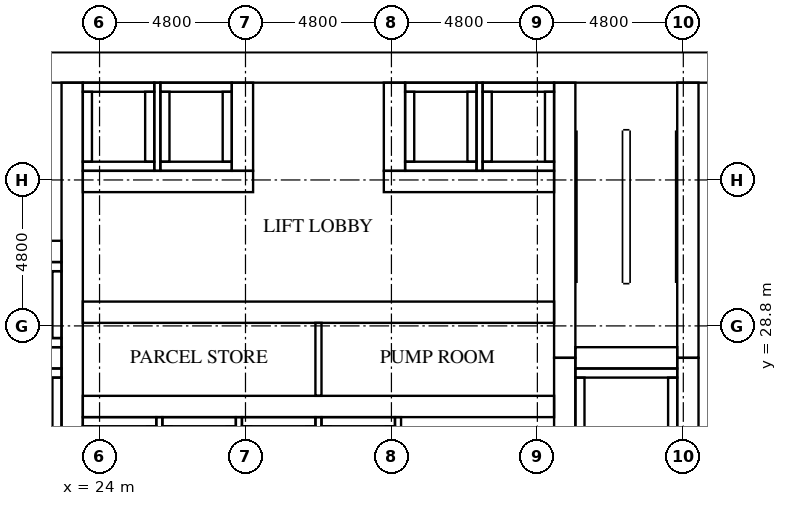
"""IFC4 building model, lengths in metres.
Left out: names, types, materials, properties, quantities, classifications, styles, units other than length and angle.
Written with IfcOpenShell. Run it as: python <this file> out.ifc"""

import sys

from ifc_helpers import new_model, si_unit, direction, frame, frame_2d, origin, place, context, subcontext, project, spatial, rectangle, extrude, element, fill, save


model = new_model("IFC4")
c1 = context("Model", 3, precision=1e-05, world=origin(), true_north=direction((0.0, 1.0)))
c2 = subcontext(c1, "Body", "Model", "MODEL_VIEW")
j1 = project(units=[si_unit("LENGTHUNIT", "METRE"), si_unit("PLANEANGLEUNIT", "RADIAN")], contexts=[c1])
p1 = place(None, origin())
s1 = spatial("IfcSite", under=j1, at=p1, CompositionType="ELEMENT")
p2 = place(p1, origin())
s2 = spatial("IfcBuilding", under=s1, at=p2, CompositionType="ELEMENT")
p3 = place(p2, origin())
s3 = spatial("IfcBuildingStorey", under=s2, at=p3, CompositionType="ELEMENT", Elevation=0.0)
p4 = place(p3, frame((15.0, 37.3, 0.0), z_axis=(0.0, 0.0, 1.0), x_axis=(1.0, 0.0, 0.0)))
e1 = element("IfcWall", 1, at=p4, inside=s3, PredefinedType="SHEAR", context=c2, shape_type="SweptSolid", body=[
    extrude(rectangle(XDim=32.4, YDim=1.0, at=frame_2d((16.2, 0.0))), origin(), (0.0, 0.0, 1.0), 5.7),
])
p5 = place(p4, frame((15.3, 0.0, 0.0)))
e2 = element("IfcOpeningElement", 2, at=p5, cuts=e1, PredefinedType="OPENING", context=c2, shape_type="SweptSolid", body=[
    extrude(rectangle(XDim=1.8, YDim=2.1, at=frame_2d((0.9, 1.05))), frame((0.0, 0.51, 0.0), z_axis=(0.0, -1.0, 0.0), x_axis=(1.0, 0.0, 0.0)), (0.0, 0.0, 1.0), 1.02),
])
p6 = place(p4, frame((1.766, 0.0, 0.0)))
e3 = element("IfcOpeningElement", 3, at=p6, cuts=e1, PredefinedType="OPENING", context=c2, shape_type="SweptSolid", body=[
    extrude(rectangle(XDim=1.0, YDim=2.1, at=frame_2d((0.5, 1.05))), frame((0.0, 0.51, 0.0), z_axis=(0.0, -1.0, 0.0), x_axis=(1.0, 0.0, 0.0)), (0.0, 0.0, 1.0), 1.02),
])
p7 = place(p4, frame((5.241, 0.0, 0.0)))
e4 = element("IfcOpeningElement", 4, at=p7, cuts=e1, PredefinedType="OPENING", context=c2, shape_type="SweptSolid", body=[
    extrude(rectangle(XDim=1.0, YDim=2.1, at=frame_2d((0.5, 1.05))), frame((0.0, 0.51, 0.0), z_axis=(0.0, -1.0, 0.0), x_axis=(1.0, 0.0, 0.0)), (0.0, 0.0, 1.0), 1.02),
])
p8 = place(p3, frame((23.1, 16.0, 0.0), z_axis=(0.0, 0.0, 1.0), x_axis=(0.0, 1.0, 0.0)))
e5 = element("IfcWall", 5, at=p8, inside=s3, PredefinedType="SHEAR", context=c2, shape_type="SweptSolid", body=[
    extrude(rectangle(XDim=20.8, YDim=0.7, at=frame_2d((10.4, 0.0))), origin(), (0.0, 0.0, 1.0), 5.7),
])
p9 = place(p3, frame((39.3, 24.25, 0.0), z_axis=(0.0, 0.0, 1.0), x_axis=(0.0, 1.0, 0.0)))
e6 = element("IfcWall", 6, at=p9, inside=s3, PredefinedType="SHEAR", context=c2, shape_type="SweptSolid", body=[
    extrude(rectangle(XDim=3.5, YDim=0.7, at=frame_2d((1.75, 0.0))), origin(), (0.0, 0.0, 1.0), 5.7),
])
p10 = place(p3, frame((39.3, 27.75, 0.0), z_axis=(0.0, 0.0, 1.0), x_axis=(0.0, 1.0, 0.0)))
e7 = element("IfcWall", 7, at=p10, inside=s3, PredefinedType="SHEAR", context=c2, shape_type="SweptSolid", body=[
    extrude(rectangle(XDim=9.05, YDim=0.7, at=frame_2d((4.525, 0.0))), origin(), (0.0, 0.0, 1.0), 5.7),
])
p11 = place(p3, frame((43.35, 24.25, 0.0), z_axis=(0.0, 0.0, 1.0), x_axis=(0.0, 1.0, 0.0)))
e8 = element("IfcWall", 8, at=p11, inside=s3, PredefinedType="SHEAR", context=c2, shape_type="SweptSolid", body=[
    extrude(rectangle(XDim=3.5, YDim=0.7, at=frame_2d((1.75, 0.0))), origin(), (0.0, 0.0, 1.0), 5.7),
])
p12 = place(p11, frame((1.2, 0.0, 0.0)))
e9 = element("IfcOpeningElement", 9, at=p12, cuts=e8, PredefinedType="OPENING", context=c2, shape_type="SweptSolid", body=[
    extrude(rectangle(XDim=1.1, YDim=2.1, at=frame_2d((0.55, 1.05))), frame((0.0, 0.36, 0.0), z_axis=(0.0, -1.0, 0.0), x_axis=(1.0, 0.0, 0.0)), (0.0, 0.0, 1.0), 0.72),
])
p13 = place(p3, frame((43.35, 27.75, 0.0), z_axis=(0.0, 0.0, 1.0), x_axis=(0.0, 1.0, 0.0)))
e10 = element("IfcWall", 10, at=p13, inside=s3, PredefinedType="SHEAR", context=c2, shape_type="SweptSolid", body=[
    extrude(rectangle(XDim=9.05, YDim=0.7, at=frame_2d((4.525, 0.0))), origin(), (0.0, 0.0, 1.0), 5.7),
])
p14 = place(p13, frame((7.65, 0.0, 0.0)))
e11 = element("IfcOpeningElement", 11, at=p14, cuts=e10, PredefinedType="OPENING", context=c2, shape_type="SweptSolid", body=[
    extrude(rectangle(XDim=1.2, YDim=2.1, at=frame_2d((0.6, 1.05))), frame((0.0, 0.36, 0.0), z_axis=(0.0, -1.0, 0.0), x_axis=(1.0, 0.0, 0.0)), (0.0, 0.0, 1.0), 0.72),
])
p15 = place(p3, frame((19.4, 27.75, 0.0), z_axis=(0.0, 0.0, 1.0), x_axis=(1.0, 0.0, 0.0)))
e12 = element("IfcWall", 12, at=p15, inside=s3, PredefinedType="SHEAR", context=c2, shape_type="SweptSolid", body=[
    extrude(rectangle(XDim=3.35, YDim=0.7, at=frame_2d((1.675, 0.0))), origin(), (0.0, 0.0, 1.0), 5.7),
])
p16 = place(p3, frame((16.0, 31.25, 0.0), z_axis=(0.0, 0.0, 1.0), x_axis=(1.0, 0.0, 0.0)))
e13 = element("IfcWall", 13, at=p16, inside=s3, PredefinedType="SHEAR", context=c2, shape_type="SweptSolid", body=[
    extrude(rectangle(XDim=6.75, YDim=0.7, at=frame_2d((3.375, 0.0))), origin(), (0.0, 0.0, 1.0), 5.7),
])
p17 = place(p3, frame((39.65, 27.75, 0.0), z_axis=(0.0, 0.0, 1.0), x_axis=(1.0, 0.0, 0.0)))
e14 = element("IfcWall", 14, at=p17, inside=s3, PredefinedType="SHEAR", context=c2, shape_type="SweptSolid", body=[
    extrude(rectangle(XDim=3.35, YDim=0.7, at=frame_2d((1.675, 0.0))), origin(), (0.0, 0.0, 1.0), 5.7),
])
p18 = place(p3, frame((23.45, 26.15, 0.0), z_axis=(0.0, 0.0, 1.0), x_axis=(1.0, 0.0, 0.0)))
e15 = element("IfcWall", 15, at=p18, inside=s3, PredefinedType="SHEAR", context=c2, shape_type="SweptSolid", body=[
    extrude(rectangle(XDim=15.5, YDim=0.7, at=frame_2d((7.75, 0.0))), origin(), (0.0, 0.0, 1.0), 5.7),
])
p19 = place(p3, frame((23.45, 29.25, 0.0), z_axis=(0.0, 0.0, 1.0), x_axis=(1.0, 0.0, 0.0)))
e16 = element("IfcWall", 16, at=p19, inside=s3, PredefinedType="SHEAR", context=c2, shape_type="SweptSolid", body=[
    extrude(rectangle(XDim=15.5, YDim=0.7, at=frame_2d((7.75, 0.0))), origin(), (0.0, 0.0, 1.0), 5.7),
])
p20 = place(p19, frame((3.325, 0.0, 0.0)))
e17 = element("IfcOpeningElement", 17, at=p20, cuts=e16, PredefinedType="OPENING", context=c2, shape_type="SweptSolid", body=[
    extrude(rectangle(XDim=1.0, YDim=2.1, at=frame_2d((0.5, 1.05))), frame((0.0, 0.36, 0.0), z_axis=(0.0, -1.0, 0.0), x_axis=(1.0, 0.0, 0.0)), (0.0, 0.0, 1.0), 0.72),
])
p21 = place(p19, frame((11.175, 0.0, 0.0)))
e18 = element("IfcOpeningElement", 18, at=p21, cuts=e16, PredefinedType="OPENING", context=c2, shape_type="SweptSolid", body=[
    extrude(rectangle(XDim=1.0, YDim=2.1, at=frame_2d((0.5, 1.05))), frame((0.0, 0.36, 0.0), z_axis=(0.0, -1.0, 0.0), x_axis=(1.0, 0.0, 0.0)), (0.0, 0.0, 1.0), 0.72),
])
p22 = place(p3, frame((23.45, 33.55, 0.0), z_axis=(0.0, 0.0, 1.0), x_axis=(1.0, 0.0, 0.0)))
e19 = element("IfcWall", 19, at=p22, inside=s3, PredefinedType="SHEAR", context=c2, shape_type="SweptSolid", body=[
    extrude(rectangle(XDim=5.6, YDim=0.7, at=frame_2d((2.8, 0.0))), origin(), (0.0, 0.0, 1.0), 5.7),
])
p23 = place(p22, frame((0.625, 0.0, 0.0)))
e20 = element("IfcOpeningElement", 20, at=p23, cuts=e19, PredefinedType="OPENING", context=c2, shape_type="SweptSolid", body=[
    extrude(rectangle(XDim=1.1, YDim=2.1, at=frame_2d((0.55, 1.05))), frame((0.0, 0.36, 0.0), z_axis=(0.0, -1.0, 0.0), x_axis=(1.0, 0.0, 0.0)), (0.0, 0.0, 1.0), 0.72),
])
p24 = place(p22, frame((3.175, 0.0, 0.0)))
e21 = element("IfcOpeningElement", 21, at=p24, cuts=e19, PredefinedType="OPENING", context=c2, shape_type="SweptSolid", body=[
    extrude(rectangle(XDim=1.1, YDim=2.1, at=frame_2d((0.55, 1.05))), frame((0.0, 0.36, 0.0), z_axis=(0.0, -1.0, 0.0), x_axis=(1.0, 0.0, 0.0)), (0.0, 0.0, 1.0), 0.72),
])
p25 = place(p3, frame((33.35, 33.55, 0.0), z_axis=(0.0, 0.0, 1.0), x_axis=(1.0, 0.0, 0.0)))
e22 = element("IfcWall", 22, at=p25, inside=s3, PredefinedType="SHEAR", context=c2, shape_type="SweptSolid", body=[
    extrude(rectangle(XDim=5.6, YDim=0.7, at=frame_2d((2.8, 0.0))), origin(), (0.0, 0.0, 1.0), 5.7),
])
p26 = place(p25, frame((1.325, 0.0, 0.0)))
e23 = element("IfcOpeningElement", 23, at=p26, cuts=e22, PredefinedType="OPENING", context=c2, shape_type="SweptSolid", body=[
    extrude(rectangle(XDim=1.1, YDim=2.1, at=frame_2d((0.55, 1.05))), frame((0.0, 0.36, 0.0), z_axis=(0.0, -1.0, 0.0), x_axis=(1.0, 0.0, 0.0)), (0.0, 0.0, 1.0), 0.72),
])
p27 = place(p25, frame((3.875, 0.0, 0.0)))
e24 = element("IfcOpeningElement", 24, at=p27, cuts=e22, PredefinedType="OPENING", context=c2, shape_type="SweptSolid", body=[
    extrude(rectangle(XDim=1.1, YDim=2.1, at=frame_2d((0.55, 1.05))), frame((0.0, 0.36, 0.0), z_axis=(0.0, -1.0, 0.0), x_axis=(1.0, 0.0, 0.0)), (0.0, 0.0, 1.0), 0.72),
])
for number, where, z_axis, x_axis in (
    (25, (28.7, 33.9, 0.0), (0.0, 0.0, 1.0), (0.0, 1.0, 0.0)),
    (26, (33.7, 33.9, 0.0), (0.0, 0.0, 1.0), (0.0, 1.0, 0.0)),
):
    element("IfcWall", number, at=place(p3, frame(where, z_axis=z_axis, x_axis=x_axis)), inside=s3, PredefinedType="SHEAR", context=c2, shape_type="SweptSolid", body=[
        extrude(rectangle(XDim=2.9, YDim=0.7, at=frame_2d((1.45, 0.0))), origin(), (0.0, 0.0, 1.0), 5.7),
    ])
for number, where, z_axis, x_axis in (
    (27, (23.45, 25.65, -1.8), (0.0, 0.0, 1.0), (1.0, 0.0, 0.0)),
    (28, (26.067, 25.65, -1.8), (0.0, 0.0, 1.0), (1.0, 0.0, 0.0)),
):
    element("IfcWall", number, at=place(p3, frame(where, z_axis=z_axis, x_axis=x_axis)), inside=s3, PredefinedType="SOLIDWALL", context=c2, shape_type="SweptSolid", body=[
        extrude(rectangle(XDim=2.417, YDim=0.3, at=frame_2d((1.208, 0.0))), origin(), (0.0, 0.0, 1.0), 1.8),
    ])
for number, where, z_axis, x_axis in (
    (29, (23.45, 34.05, -1.8), (0.0, 0.0, 1.0), (1.0, 0.0, 0.0)),
    (30, (23.45, 36.65, -1.8), (0.0, 0.0, 1.0), (1.0, 0.0, 0.0)),
):
    element("IfcWall", number, at=place(p3, frame(where, z_axis=z_axis, x_axis=x_axis)), inside=s3, PredefinedType="SOLIDWALL", context=c2, shape_type="SweptSolid", body=[
        extrude(rectangle(XDim=2.35, YDim=0.3, at=frame_2d((1.175, 0.0))), origin(), (0.0, 0.0, 1.0), 1.8),
    ])
for number, where, z_axis, x_axis in (
    (31, (23.6, 34.2, -1.8), (0.0, 0.0, 1.0), (0.0, 1.0, 0.0)),
    (32, (25.65, 34.2, -1.8), (0.0, 0.0, 1.0), (0.0, 1.0, 0.0)),
):
    element("IfcWall", number, at=place(p3, frame(where, z_axis=z_axis, x_axis=x_axis)), inside=s3, PredefinedType="SOLIDWALL", context=c2, shape_type="SweptSolid", body=[
        extrude(rectangle(XDim=2.3, YDim=0.3, at=frame_2d((1.15, 0.0))), origin(), (0.0, 0.0, 1.0), 1.8),
    ])
for number, where, z_axis, x_axis in (
    (33, (26.0, 34.05, -1.8), (0.0, 0.0, 1.0), (1.0, 0.0, 0.0)),
    (34, (26.0, 36.65, -1.8), (0.0, 0.0, 1.0), (1.0, 0.0, 0.0)),
):
    element("IfcWall", number, at=place(p3, frame(where, z_axis=z_axis, x_axis=x_axis)), inside=s3, PredefinedType="SOLIDWALL", context=c2, shape_type="SweptSolid", body=[
        extrude(rectangle(XDim=2.35, YDim=0.3, at=frame_2d((1.175, 0.0))), origin(), (0.0, 0.0, 1.0), 1.8),
    ])
for number, where, z_axis, x_axis in (
    (35, (26.15, 34.2, -1.8), (0.0, 0.0, 1.0), (0.0, 1.0, 0.0)),
    (36, (28.2, 34.2, -1.8), (0.0, 0.0, 1.0), (0.0, 1.0, 0.0)),
):
    element("IfcWall", number, at=place(p3, frame(where, z_axis=z_axis, x_axis=x_axis)), inside=s3, PredefinedType="SOLIDWALL", context=c2, shape_type="SweptSolid", body=[
        extrude(rectangle(XDim=2.3, YDim=0.3, at=frame_2d((1.15, 0.0))), origin(), (0.0, 0.0, 1.0), 1.8),
    ])
for number, where, z_axis, x_axis in (
    (37, (34.05, 34.05, -1.8), (0.0, 0.0, 1.0), (1.0, 0.0, 0.0)),
    (38, (34.05, 36.65, -1.8), (0.0, 0.0, 1.0), (1.0, 0.0, 0.0)),
):
    element("IfcWall", number, at=place(p3, frame(where, z_axis=z_axis, x_axis=x_axis)), inside=s3, PredefinedType="SOLIDWALL", context=c2, shape_type="SweptSolid", body=[
        extrude(rectangle(XDim=2.35, YDim=0.3, at=frame_2d((1.175, 0.0))), origin(), (0.0, 0.0, 1.0), 1.8),
    ])
for number, where, z_axis, x_axis in (
    (39, (34.2, 34.2, -1.8), (0.0, 0.0, 1.0), (0.0, 1.0, 0.0)),
    (40, (36.25, 34.2, -1.8), (0.0, 0.0, 1.0), (0.0, 1.0, 0.0)),
):
    element("IfcWall", number, at=place(p3, frame(where, z_axis=z_axis, x_axis=x_axis)), inside=s3, PredefinedType="SOLIDWALL", context=c2, shape_type="SweptSolid", body=[
        extrude(rectangle(XDim=2.3, YDim=0.3, at=frame_2d((1.15, 0.0))), origin(), (0.0, 0.0, 1.0), 1.8),
    ])
for number, where, z_axis, x_axis in (
    (41, (36.6, 34.05, -1.8), (0.0, 0.0, 1.0), (1.0, 0.0, 0.0)),
    (42, (36.6, 36.65, -1.8), (0.0, 0.0, 1.0), (1.0, 0.0, 0.0)),
):
    element("IfcWall", number, at=place(p3, frame(where, z_axis=z_axis, x_axis=x_axis)), inside=s3, PredefinedType="SOLIDWALL", context=c2, shape_type="SweptSolid", body=[
        extrude(rectangle(XDim=2.35, YDim=0.3, at=frame_2d((1.175, 0.0))), origin(), (0.0, 0.0, 1.0), 1.8),
    ])
for number, where, z_axis, x_axis in (
    (43, (36.75, 34.2, -1.8), (0.0, 0.0, 1.0), (0.0, 1.0, 0.0)),
    (44, (38.8, 34.2, -1.8), (0.0, 0.0, 1.0), (0.0, 1.0, 0.0)),
):
    element("IfcWall", number, at=place(p3, frame(where, z_axis=z_axis, x_axis=x_axis)), inside=s3, PredefinedType="SOLIDWALL", context=c2, shape_type="SweptSolid", body=[
        extrude(rectangle(XDim=2.3, YDim=0.3, at=frame_2d((1.15, 0.0))), origin(), (0.0, 0.0, 1.0), 1.8),
    ])
p28 = place(p3, frame((28.683, 25.65, -1.8), z_axis=(0.0, 0.0, 1.0), x_axis=(1.0, 0.0, 0.0)))
e45 = element("IfcWall", 45, at=p28, inside=s3, PredefinedType="SOLIDWALL", context=c2, shape_type="SweptSolid", body=[
    extrude(rectangle(XDim=2.417, YDim=0.3, at=frame_2d((1.208, 0.0))), origin(), (0.0, 0.0, 1.0), 1.8),
])
p29 = place(p3, frame((31.3, 25.65, -1.8), z_axis=(0.0, 0.0, 1.0), x_axis=(1.0, 0.0, 0.0)))
e46 = element("IfcWall", 46, at=p29, inside=s3, PredefinedType="SOLIDWALL", context=c2, shape_type="SweptSolid", body=[
    extrude(rectangle(XDim=2.417, YDim=0.3, at=frame_2d((1.208, 0.0))), origin(), (0.0, 0.0, 1.0), 1.8),
])
p30 = place(p3, frame((19.4, 27.25, -1.8), z_axis=(0.0, 0.0, 1.0), x_axis=(1.0, 0.0, 0.0)))
e47 = element("IfcWall", 47, at=p30, inside=s3, PredefinedType="SOLIDWALL", context=c2, shape_type="SweptSolid", body=[
    extrude(rectangle(XDim=3.35, YDim=0.3, at=frame_2d((1.675, 0.0))), origin(), (0.0, 0.0, 1.0), 1.8),
])
p31 = place(p3, frame((22.6, 24.9, -1.8), z_axis=(0.0, 0.0, 1.0), x_axis=(0.0, 1.0, 0.0)))
e48 = element("IfcWall", 48, at=p31, inside=s3, PredefinedType="SOLIDWALL", context=c2, shape_type="SweptSolid", body=[
    extrude(rectangle(XDim=2.2, YDim=0.3, at=frame_2d((1.1, 0.0))), origin(), (0.0, 0.0, 1.0), 1.8),
])
for number, where, z_axis, x_axis in (
    (49, (19.4, 28.25, -1.8), (0.0, 0.0, 1.0), (1.0, 0.0, 0.0)),
    (50, (19.4, 30.75, -1.8), (0.0, 0.0, 1.0), (1.0, 0.0, 0.0)),
):
    element("IfcWall", number, at=place(p3, frame(where, z_axis=z_axis, x_axis=x_axis)), inside=s3, PredefinedType="SOLIDWALL", context=c2, shape_type="SweptSolid", body=[
        extrude(rectangle(XDim=3.35, YDim=0.3, at=frame_2d((1.675, 0.0))), origin(), (0.0, 0.0, 1.0), 1.8),
    ])
p32 = place(p3, frame((22.6, 28.4, -1.8), z_axis=(0.0, 0.0, 1.0), x_axis=(0.0, 1.0, 0.0)))
e51 = element("IfcWall", 51, at=p32, inside=s3, PredefinedType="SOLIDWALL", context=c2, shape_type="SweptSolid", body=[
    extrude(rectangle(XDim=2.2, YDim=0.3, at=frame_2d((1.1, 0.0))), origin(), (0.0, 0.0, 1.0), 1.8),
])
p33 = place(p3, frame((39.65, 27.25, -1.8), z_axis=(0.0, 0.0, 1.0), x_axis=(1.0, 0.0, 0.0)))
e52 = element("IfcWall", 52, at=p33, inside=s3, PredefinedType="SOLIDWALL", context=c2, shape_type="SweptSolid", body=[
    extrude(rectangle(XDim=3.35, YDim=0.3, at=frame_2d((1.675, 0.0))), origin(), (0.0, 0.0, 1.0), 1.8),
])
for number, where, z_axis, x_axis in (
    (53, (39.8, 24.9, -1.8), (0.0, 0.0, 1.0), (0.0, 1.0, 0.0)),
    (54, (42.85, 24.9, -1.8), (0.0, 0.0, 1.0), (0.0, 1.0, 0.0)),
):
    element("IfcWall", number, at=place(p3, frame(where, z_axis=z_axis, x_axis=x_axis)), inside=s3, PredefinedType="SOLIDWALL", context=c2, shape_type="SweptSolid", body=[
        extrude(rectangle(XDim=2.2, YDim=0.3, at=frame_2d((1.1, 0.0))), origin(), (0.0, 0.0, 1.0), 1.8),
    ])
for number, where, z_axis, x_axis in (
    (55, (25.967, 23.4, 0.0), (0.0, 0.0, 1.0), (0.0, 1.0, 0.0)),
    (56, (28.583, 23.4, 0.0), (0.0, 0.0, 1.0), (0.0, 1.0, 0.0)),
    (57, (31.2, 23.4, 0.0), (0.0, 0.0, 1.0), (0.0, 1.0, 0.0)),
    (58, (33.817, 23.4, 0.0), (0.0, 0.0, 1.0), (0.0, 1.0, 0.0)),
):
    element("IfcWall", number, at=place(p3, frame(where, z_axis=z_axis, x_axis=x_axis)), inside=s3, PredefinedType="SOLIDWALL", context=c2, shape_type="SweptSolid", body=[
        extrude(rectangle(XDim=2.4, YDim=0.2, at=frame_2d((1.2, 0.0))), origin(), (0.0, 0.0, 1.0), 5.7),
    ])
for number, where, z_axis, x_axis in (
    (59, (25.9, 33.9, 0.0), (0.0, 0.0, 1.0), (0.0, 1.0, 0.0)),
    (60, (36.5, 33.9, 0.0), (0.0, 0.0, 1.0), (0.0, 1.0, 0.0)),
):
    element("IfcWall", number, at=place(p3, frame(where, z_axis=z_axis, x_axis=x_axis)), inside=s3, PredefinedType="SOLIDWALL", context=c2, shape_type="SweptSolid", body=[
        extrude(rectangle(XDim=2.9, YDim=0.2, at=frame_2d((1.45, 0.0))), origin(), (0.0, 0.0, 1.0), 5.7),
    ])
p34 = place(p3, frame((31.2, 26.5, 0.0), z_axis=(0.0, 0.0, 1.0), x_axis=(0.0, 1.0, 0.0)))
e61 = element("IfcWall", 61, at=p34, inside=s3, PredefinedType="PARTITIONING", context=c2, shape_type="SweptSolid", body=[
    extrude(rectangle(XDim=2.4, YDim=0.2, at=frame_2d((1.2, 0.0))), origin(), (0.0, 0.0, 1.0), 5.7),
])
p35 = place(p23, origin())
e62 = element("IfcDoor", 62, at=p35, inside=s3, OperationType="DOUBLE_DOOR_SLIDING", PredefinedType="DOOR", context=c2, shape_type="SweptSolid", body=[
    extrude(rectangle(XDim=1.1, YDim=2.1, at=frame_2d((0.55, 1.05))), frame((0.0, 0.025, 0.0), z_axis=(0.0, -1.0, 0.0), x_axis=(1.0, 0.0, 0.0)), (0.0, 0.0, 1.0), 0.05),
])
fill(e20, e62)
p36 = place(p24, origin())
e63 = element("IfcDoor", 63, at=p36, inside=s3, OperationType="DOUBLE_DOOR_SLIDING", PredefinedType="DOOR", context=c2, shape_type="SweptSolid", body=[
    extrude(rectangle(XDim=1.1, YDim=2.1, at=frame_2d((0.55, 1.05))), frame((0.0, 0.025, 0.0), z_axis=(0.0, -1.0, 0.0), x_axis=(1.0, 0.0, 0.0)), (0.0, 0.0, 1.0), 0.05),
])
fill(e21, e63)
p37 = place(p26, origin())
e64 = element("IfcDoor", 64, at=p37, inside=s3, OperationType="DOUBLE_DOOR_SLIDING", PredefinedType="DOOR", context=c2, shape_type="SweptSolid", body=[
    extrude(rectangle(XDim=1.1, YDim=2.1, at=frame_2d((0.55, 1.05))), frame((0.0, 0.025, 0.0), z_axis=(0.0, -1.0, 0.0), x_axis=(1.0, 0.0, 0.0)), (0.0, 0.0, 1.0), 0.05),
])
fill(e23, e64)
p38 = place(p27, origin())
e65 = element("IfcDoor", 65, at=p38, inside=s3, OperationType="DOUBLE_DOOR_SLIDING", PredefinedType="DOOR", context=c2, shape_type="SweptSolid", body=[
    extrude(rectangle(XDim=1.1, YDim=2.1, at=frame_2d((0.55, 1.05))), frame((0.0, 0.025, 0.0), z_axis=(0.0, -1.0, 0.0), x_axis=(1.0, 0.0, 0.0)), (0.0, 0.0, 1.0), 0.05),
])
fill(e24, e65)
p39 = place(p12, origin())
e66 = element("IfcDoor", 66, at=p39, inside=s3, OperationType="DOUBLE_DOOR_SLIDING", PredefinedType="DOOR", context=c2, shape_type="SweptSolid", body=[
    extrude(rectangle(XDim=1.1, YDim=2.1, at=frame_2d((0.55, 1.05))), frame((0.0, 0.025, 0.0), z_axis=(0.0, -1.0, 0.0), x_axis=(1.0, 0.0, 0.0)), (0.0, 0.0, 1.0), 0.05),
])
fill(e9, e66)
p40 = place(p14, frame((1.2, 0.0, 0.0), z_axis=(0.0, 0.0, 1.0), x_axis=(-1.0, 0.0, 0.0)))
e67 = element("IfcDoor", 67, at=p40, inside=s3, OperationType="SINGLE_SWING_RIGHT", PredefinedType="DOOR", context=c2, shape_type="SweptSolid", body=[
    extrude(rectangle(XDim=1.2, YDim=2.1, at=frame_2d((0.6, 1.05))), frame((0.0, 0.025, 0.0), z_axis=(0.0, -1.0, 0.0), x_axis=(1.0, 0.0, 0.0)), (0.0, 0.0, 1.0), 0.05),
])
fill(e11, e67)
p41 = place(p5, origin())
e68 = element("IfcDoor", 68, at=p41, inside=s3, OperationType="DOUBLE_DOOR_SINGLE_SWING", PredefinedType="DOOR", context=c2, shape_type="SweptSolid", body=[
    extrude(rectangle(XDim=1.8, YDim=2.1, at=frame_2d((0.9, 1.05))), frame((0.0, 0.025, 0.0), z_axis=(0.0, -1.0, 0.0), x_axis=(1.0, 0.0, 0.0)), (0.0, 0.0, 1.0), 0.05),
])
fill(e2, e68)
p42 = place(p20, origin())
e69 = element("IfcDoor", 69, at=p42, inside=s3, OperationType="SINGLE_SWING_RIGHT", PredefinedType="DOOR", context=c2, shape_type="SweptSolid", body=[
    extrude(rectangle(XDim=1.0, YDim=2.1, at=frame_2d((0.5, 1.05))), frame((0.0, 0.025, 0.0), z_axis=(0.0, -1.0, 0.0), x_axis=(1.0, 0.0, 0.0)), (0.0, 0.0, 1.0), 0.05),
])
fill(e17, e69)
p43 = place(p21, origin())
e70 = element("IfcDoor", 70, at=p43, inside=s3, OperationType="SINGLE_SWING_LEFT", PredefinedType="DOOR", context=c2, shape_type="SweptSolid", body=[
    extrude(rectangle(XDim=1.0, YDim=2.1, at=frame_2d((0.5, 1.05))), frame((0.0, 0.025, 0.0), z_axis=(0.0, -1.0, 0.0), x_axis=(1.0, 0.0, 0.0)), (0.0, 0.0, 1.0), 0.05),
])
fill(e18, e70)
save(model, sys.argv[1])
